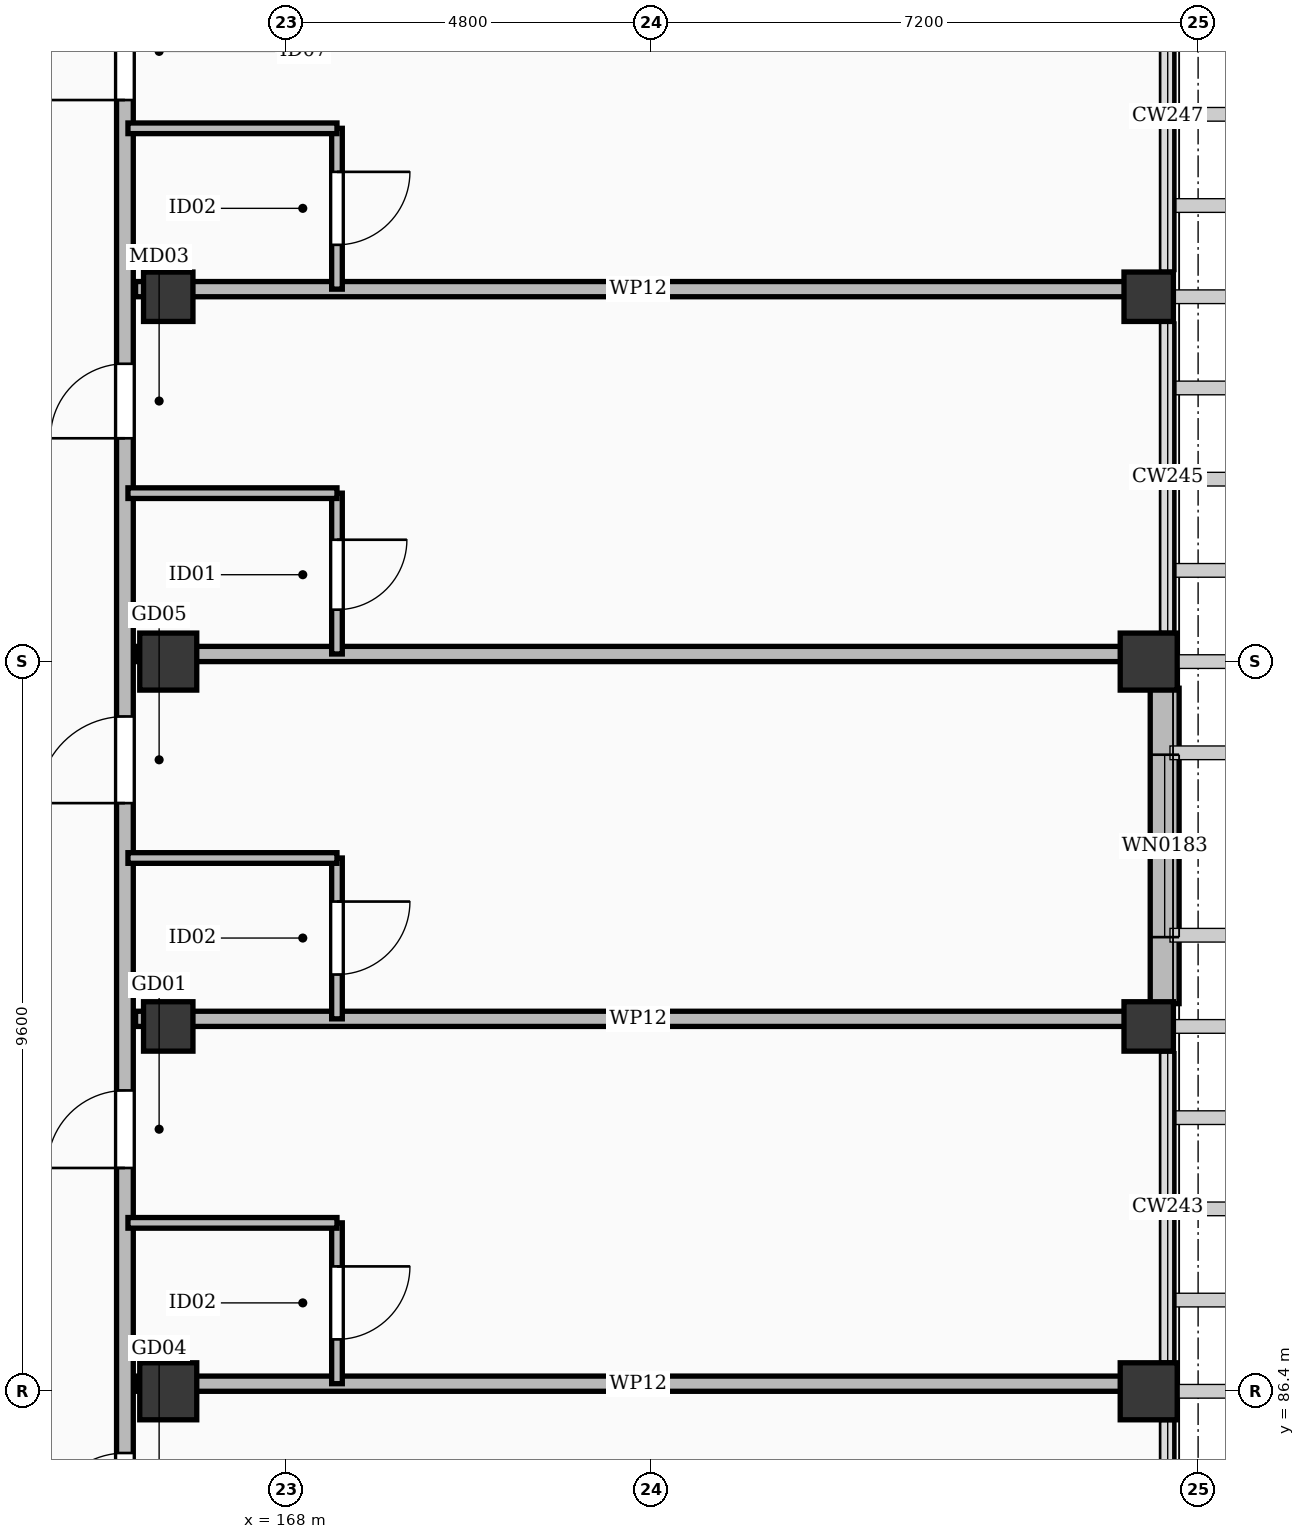
"""IFC4 building model, lengths in metres.
Left out: names, types, materials, properties, quantities, classifications, styles, units other than length and angle.
Written with IfcOpenShell. Run it as: python <this file> out.ifc"""

import sys

from ifc_helpers import new_model, si_unit, direction, frame, frame_2d, origin, origin_2d, place, context, subcontext, project, spatial, rectangle, extrude, element, fill, save


model = new_model("IFC4")
c1 = context("Model", 3, precision=1e-05, world=origin(), true_north=direction((0.0, 1.0)))
c2 = subcontext(c1, "Body", "Model", "MODEL_VIEW")
j1 = project(units=[si_unit("LENGTHUNIT", "METRE"), si_unit("PLANEANGLEUNIT", "RADIAN")], contexts=[c1])
p1 = place(None, origin())
s1 = spatial("IfcSite", under=j1, at=p1, CompositionType="ELEMENT")
p2 = place(p1, origin())
s2 = spatial("IfcBuilding", under=s1, at=p2, CompositionType="ELEMENT")
p3 = place(p2, frame((0.0, 0.0, 28.2)))
s3 = spatial("IfcBuildingStorey", under=s2, at=p3, CompositionType="ELEMENT", Elevation=28.2)
for number, where, z_axis, x_axis in (
    (1, (166.45, 86.4, 0.0), (0.0, 0.0, 1.0), (1.0, 0.0, 0.0)),
    (2, (166.45, 96.0, 0.0), (0.0, 0.0, 1.0), (1.0, 0.0, 0.0)),
    (3, (179.35, 86.4, 0.0), (0.0, 0.0, 1.0), (1.0, 0.0, 0.0)),
    (4, (179.35, 96.0, 0.0), (0.0, 0.0, 1.0), (1.0, 0.0, 0.0)),
):
    element("IfcColumn", number, at=place(p3, frame(where, z_axis=z_axis, x_axis=x_axis)), inside=s3, PredefinedType="COLUMN", context=c2, shape_type="SweptSolid", body=[
        extrude(rectangle(XDim=0.75, YDim=0.75, at=origin_2d()), origin(), (0.0, 0.0, 1.0), 3.6),
    ])
for number, where, z_axis, x_axis in (
    (5, (166.45, 91.2, 0.0), (0.0, 0.0, 1.0), (1.0, 0.0, 0.0)),
    (6, (166.45, 100.8, 0.0), (0.0, 0.0, 1.0), (1.0, 0.0, 0.0)),
    (7, (179.35, 91.2, 0.0), (0.0, 0.0, 1.0), (1.0, 0.0, 0.0)),
    (8, (179.35, 100.8, 0.0), (0.0, 0.0, 1.0), (1.0, 0.0, 0.0)),
):
    element("IfcColumn", number, at=place(p3, frame(where, z_axis=z_axis, x_axis=x_axis)), inside=s3, PredefinedType="COLUMN", context=c2, shape_type="SweptSolid", body=[
        extrude(rectangle(XDim=0.65, YDim=0.65, at=origin_2d()), origin(), (0.0, 0.0, 1.0), 3.6),
    ])
p4 = place(p3, frame((179.56, 95.65, 0.0), z_axis=(0.0, 0.0, 1.0), x_axis=(0.0, -1.0, 0.0)))
e9 = element("IfcWall", 9, at=p4, inside=s3, PredefinedType="SOLIDWALL", context=c2, shape_type="SweptSolid", body=[
    extrude(rectangle(XDim=4.15, YDim=0.38, at=frame_2d((2.075, 0.0))), origin(), (0.0, 0.0, 1.0), 2.582),
])
p5 = place(p4, frame((0.875, 0.0, 0.55)))
e10 = element("IfcOpeningElement", 10, at=p5, cuts=e9, PredefinedType="OPENING", context=c2, shape_type="SweptSolid", body=[
    extrude(rectangle(XDim=2.4, YDim=1.8, at=frame_2d((1.2, 0.9))), frame((0.0, 0.202, 0.0), z_axis=(0.0, -1.0, 0.0), x_axis=(1.0, 0.0, 0.0)), (0.0, 0.0, 1.0), 0.404),
])
p6 = place(p3, frame((165.88, 38.75, 0.0), z_axis=(0.0, 0.0, 1.0), x_axis=(0.0, 1.0, 0.0)))
e11 = element("IfcWall", 11, at=p6, inside=s3, PredefinedType="PARTITIONING", context=c2, shape_type="SweptSolid", body=[
    extrude(rectangle(XDim=86.9, YDim=0.22, at=frame_2d((43.45, 0.0))), origin(), (0.0, 0.0, 1.0), 2.582),
])
p7 = place(p6, frame((0.691, 0.0, 0.0)))
e12 = element("IfcOpeningElement", 12, at=p7, cuts=e11, PredefinedType="OPENING", context=c2, shape_type="SweptSolid", body=[
    extrude(rectangle(XDim=0.98, YDim=2.15, at=frame_2d((0.49, 1.075))), frame((0.0, 0.122, 0.0), z_axis=(0.0, -1.0, 0.0), x_axis=(1.0, 0.0, 0.0)), (0.0, 0.0, 1.0), 0.244),
])
p8 = place(p6, frame((7.038, 0.0, 0.0)))
e13 = element("IfcOpeningElement", 13, at=p8, cuts=e11, PredefinedType="OPENING", context=c2, shape_type="SweptSolid", body=[
    extrude(rectangle(XDim=1.28, YDim=2.16, at=frame_2d((0.64, 1.08))), frame((0.0, 0.122, 0.0), z_axis=(0.0, -1.0, 0.0), x_axis=(1.0, 0.0, 0.0)), (0.0, 0.0, 1.0), 0.244),
])
p9 = place(p6, frame((12.188, 0.0, 0.0)))
e14 = element("IfcOpeningElement", 14, at=p9, cuts=e11, PredefinedType="OPENING", context=c2, shape_type="SweptSolid", body=[
    extrude(rectangle(XDim=0.9, YDim=2.08, at=frame_2d((0.45, 1.04))), frame((0.0, 0.122, 0.0), z_axis=(0.0, -1.0, 0.0), x_axis=(1.0, 0.0, 0.0)), (0.0, 0.0, 1.0), 0.244),
])
p10 = place(p6, frame((16.988, 0.0, 0.0)))
e15 = element("IfcOpeningElement", 15, at=p10, cuts=e11, PredefinedType="OPENING", context=c2, shape_type="SweptSolid", body=[
    extrude(rectangle(XDim=1.05, YDim=2.22, at=frame_2d((0.525, 1.11))), frame((0.0, 0.122, 0.0), z_axis=(0.0, -1.0, 0.0), x_axis=(1.0, 0.0, 0.0)), (0.0, 0.0, 1.0), 0.244),
])
p11 = place(p6, frame((21.788, 0.0, 0.0)))
e16 = element("IfcOpeningElement", 16, at=p11, cuts=e11, PredefinedType="OPENING", context=c2, shape_type="SweptSolid", body=[
    extrude(rectangle(XDim=1.02, YDim=2.2, at=frame_2d((0.51, 1.1))), frame((0.0, 0.122, 0.0), z_axis=(0.0, -1.0, 0.0), x_axis=(1.0, 0.0, 0.0)), (0.0, 0.0, 1.0), 0.244),
])
p12 = place(p6, frame((26.588, 0.0, 0.0)))
e17 = element("IfcOpeningElement", 17, at=p12, cuts=e11, PredefinedType="OPENING", context=c2, shape_type="SweptSolid", body=[
    extrude(rectangle(XDim=1.14, YDim=2.26, at=frame_2d((0.57, 1.13))), frame((0.0, 0.122, 0.0), z_axis=(0.0, -1.0, 0.0), x_axis=(1.0, 0.0, 0.0)), (0.0, 0.0, 1.0), 0.244),
])
p13 = place(p6, frame((31.388, 0.0, 0.0)))
e18 = element("IfcOpeningElement", 18, at=p13, cuts=e11, PredefinedType="OPENING", context=c2, shape_type="SweptSolid", body=[
    extrude(rectangle(XDim=0.98, YDim=2.15, at=frame_2d((0.49, 1.075))), frame((0.0, 0.122, 0.0), z_axis=(0.0, -1.0, 0.0), x_axis=(1.0, 0.0, 0.0)), (0.0, 0.0, 1.0), 0.244),
])
p14 = place(p6, frame((35.838, 0.0, 0.0)))
e19 = element("IfcOpeningElement", 19, at=p14, cuts=e11, PredefinedType="OPENING", context=c2, shape_type="SweptSolid", body=[
    extrude(rectangle(XDim=1.28, YDim=2.16, at=frame_2d((0.64, 1.08))), frame((0.0, 0.122, 0.0), z_axis=(0.0, -1.0, 0.0), x_axis=(1.0, 0.0, 0.0)), (0.0, 0.0, 1.0), 0.244),
])
p15 = place(p6, frame((40.988, 0.0, 0.0)))
e20 = element("IfcOpeningElement", 20, at=p15, cuts=e11, PredefinedType="OPENING", context=c2, shape_type="SweptSolid", body=[
    extrude(rectangle(XDim=0.9, YDim=2.08, at=frame_2d((0.45, 1.04))), frame((0.0, 0.122, 0.0), z_axis=(0.0, -1.0, 0.0), x_axis=(1.0, 0.0, 0.0)), (0.0, 0.0, 1.0), 0.244),
])
p16 = place(p6, frame((45.788, 0.0, 0.0)))
e21 = element("IfcOpeningElement", 21, at=p16, cuts=e11, PredefinedType="OPENING", context=c2, shape_type="SweptSolid", body=[
    extrude(rectangle(XDim=1.05, YDim=2.22, at=frame_2d((0.525, 1.11))), frame((0.0, 0.122, 0.0), z_axis=(0.0, -1.0, 0.0), x_axis=(1.0, 0.0, 0.0)), (0.0, 0.0, 1.0), 0.244),
])
p17 = place(p6, frame((50.588, 0.0, 0.0)))
e22 = element("IfcOpeningElement", 22, at=p17, cuts=e11, PredefinedType="OPENING", context=c2, shape_type="SweptSolid", body=[
    extrude(rectangle(XDim=1.02, YDim=2.2, at=frame_2d((0.51, 1.1))), frame((0.0, 0.122, 0.0), z_axis=(0.0, -1.0, 0.0), x_axis=(1.0, 0.0, 0.0)), (0.0, 0.0, 1.0), 0.244),
])
p18 = place(p6, frame((55.388, 0.0, 0.0)))
e23 = element("IfcOpeningElement", 23, at=p18, cuts=e11, PredefinedType="OPENING", context=c2, shape_type="SweptSolid", body=[
    extrude(rectangle(XDim=1.14, YDim=2.26, at=frame_2d((0.57, 1.13))), frame((0.0, 0.122, 0.0), z_axis=(0.0, -1.0, 0.0), x_axis=(1.0, 0.0, 0.0)), (0.0, 0.0, 1.0), 0.244),
])
p19 = place(p6, frame((60.188, 0.0, 0.0)))
e24 = element("IfcOpeningElement", 24, at=p19, cuts=e11, PredefinedType="OPENING", context=c2, shape_type="SweptSolid", body=[
    extrude(rectangle(XDim=0.98, YDim=2.15, at=frame_2d((0.49, 1.075))), frame((0.0, 0.122, 0.0), z_axis=(0.0, -1.0, 0.0), x_axis=(1.0, 0.0, 0.0)), (0.0, 0.0, 1.0), 0.244),
])
p20 = place(p6, frame((64.638, 0.0, 0.0)))
e25 = element("IfcOpeningElement", 25, at=p20, cuts=e11, PredefinedType="OPENING", context=c2, shape_type="SweptSolid", body=[
    extrude(rectangle(XDim=1.28, YDim=2.16, at=frame_2d((0.64, 1.08))), frame((0.0, 0.122, 0.0), z_axis=(0.0, -1.0, 0.0), x_axis=(1.0, 0.0, 0.0)), (0.0, 0.0, 1.0), 0.244),
])
p21 = place(p6, frame((69.788, 0.0, 0.0)))
e26 = element("IfcOpeningElement", 26, at=p21, cuts=e11, PredefinedType="OPENING", context=c2, shape_type="SweptSolid", body=[
    extrude(rectangle(XDim=0.9, YDim=2.08, at=frame_2d((0.45, 1.04))), frame((0.0, 0.122, 0.0), z_axis=(0.0, -1.0, 0.0), x_axis=(1.0, 0.0, 0.0)), (0.0, 0.0, 1.0), 0.244),
])
p22 = place(p6, frame((74.588, 0.0, 0.0)))
e27 = element("IfcOpeningElement", 27, at=p22, cuts=e11, PredefinedType="OPENING", context=c2, shape_type="SweptSolid", body=[
    extrude(rectangle(XDim=1.05, YDim=2.22, at=frame_2d((0.525, 1.11))), frame((0.0, 0.122, 0.0), z_axis=(0.0, -1.0, 0.0), x_axis=(1.0, 0.0, 0.0)), (0.0, 0.0, 1.0), 0.244),
])
p23 = place(p6, frame((79.388, 0.0, 0.0)))
e28 = element("IfcOpeningElement", 28, at=p23, cuts=e11, PredefinedType="OPENING", context=c2, shape_type="SweptSolid", body=[
    extrude(rectangle(XDim=1.02, YDim=2.2, at=frame_2d((0.51, 1.1))), frame((0.0, 0.122, 0.0), z_axis=(0.0, -1.0, 0.0), x_axis=(1.0, 0.0, 0.0)), (0.0, 0.0, 1.0), 0.244),
])
p24 = place(p6, frame((84.188, 0.0, 0.0)))
e29 = element("IfcOpeningElement", 29, at=p24, cuts=e11, PredefinedType="OPENING", context=c2, shape_type="SweptSolid", body=[
    extrude(rectangle(XDim=1.14, YDim=2.26, at=frame_2d((0.57, 1.13))), frame((0.0, 0.122, 0.0), z_axis=(0.0, -1.0, 0.0), x_axis=(1.0, 0.0, 0.0)), (0.0, 0.0, 1.0), 0.244),
])
p25 = place(p3, frame((166.02, 86.5, 0.0), z_axis=(0.0, 0.0, 1.0), x_axis=(1.0, 0.0, 0.0)))
e30 = element("IfcWall", 30, at=p25, inside=s3, PredefinedType="PARTITIONING", context=c2, shape_type="SweptSolid", body=[
    extrude(rectangle(XDim=13.23, YDim=0.2, at=frame_2d((6.615, 0.0))), origin(), (0.0, 0.0, 1.0), 2.582),
])
p26 = place(p3, frame((168.67, 86.5, 0.0), z_axis=(0.0, 0.0, 1.0), x_axis=(0.0, 1.0, 0.0)))
e31 = element("IfcWall", 31, at=p26, inside=s3, PredefinedType="PARTITIONING", context=c2, shape_type="SweptSolid", body=[
    extrude(rectangle(XDim=2.116, YDim=0.14, at=frame_2d((1.058, 0.0))), origin(), (0.0, 0.0, 1.0), 2.682),
])
p27 = place(p26, frame((0.583, 0.0, 0.0)))
e32 = element("IfcOpeningElement", 32, at=p27, cuts=e31, PredefinedType="OPENING", context=c2, shape_type="SweptSolid", body=[
    extrude(rectangle(XDim=0.96, YDim=2.12, at=frame_2d((0.48, 1.06))), frame((0.0, 0.082, 0.0), z_axis=(0.0, -1.0, 0.0), x_axis=(1.0, 0.0, 0.0)), (0.0, 0.0, 1.0), 0.164),
])
p28 = place(p3, frame((165.92, 88.616, 0.0), z_axis=(0.0, 0.0, 1.0), x_axis=(1.0, 0.0, 0.0)))
e33 = element("IfcWall", 33, at=p28, inside=s3, PredefinedType="PARTITIONING", context=c2, shape_type="SweptSolid", body=[
    extrude(rectangle(XDim=2.75, YDim=0.14, at=frame_2d((1.375, 0.0))), origin(), (0.0, 0.0, 1.0), 2.682),
])
p29 = place(p3, frame((166.02, 91.3, 0.0), z_axis=(0.0, 0.0, 1.0), x_axis=(1.0, 0.0, 0.0)))
e34 = element("IfcWall", 34, at=p29, inside=s3, PredefinedType="PARTITIONING", context=c2, shape_type="SweptSolid", body=[
    extrude(rectangle(XDim=13.23, YDim=0.2, at=frame_2d((6.615, 0.0))), origin(), (0.0, 0.0, 1.0), 2.582),
])
p30 = place(p3, frame((168.67, 91.3, 0.0), z_axis=(0.0, 0.0, 1.0), x_axis=(0.0, 1.0, 0.0)))
e35 = element("IfcWall", 35, at=p30, inside=s3, PredefinedType="PARTITIONING", context=c2, shape_type="SweptSolid", body=[
    extrude(rectangle(XDim=2.116, YDim=0.14, at=frame_2d((1.058, 0.0))), origin(), (0.0, 0.0, 1.0), 2.682),
])
p31 = place(p30, frame((0.583, 0.0, 0.0)))
e36 = element("IfcOpeningElement", 36, at=p31, cuts=e35, PredefinedType="OPENING", context=c2, shape_type="SweptSolid", body=[
    extrude(rectangle(XDim=0.96, YDim=2.12, at=frame_2d((0.48, 1.06))), frame((0.0, 0.082, 0.0), z_axis=(0.0, -1.0, 0.0), x_axis=(1.0, 0.0, 0.0)), (0.0, 0.0, 1.0), 0.164),
])
p32 = place(p3, frame((165.92, 93.416, 0.0), z_axis=(0.0, 0.0, 1.0), x_axis=(1.0, 0.0, 0.0)))
e37 = element("IfcWall", 37, at=p32, inside=s3, PredefinedType="PARTITIONING", context=c2, shape_type="SweptSolid", body=[
    extrude(rectangle(XDim=2.75, YDim=0.14, at=frame_2d((1.375, 0.0))), origin(), (0.0, 0.0, 1.0), 2.682),
])
p33 = place(p3, frame((166.02, 96.1, 0.0), z_axis=(0.0, 0.0, 1.0), x_axis=(1.0, 0.0, 0.0)))
e38 = element("IfcWall", 38, at=p33, inside=s3, PredefinedType="PARTITIONING", context=c2, shape_type="SweptSolid", body=[
    extrude(rectangle(XDim=13.23, YDim=0.2, at=frame_2d((6.615, 0.0))), origin(), (0.0, 0.0, 1.0), 2.582),
])
p34 = place(p3, frame((168.67, 96.1, 0.0), z_axis=(0.0, 0.0, 1.0), x_axis=(0.0, 1.0, 0.0)))
e39 = element("IfcWall", 39, at=p34, inside=s3, PredefinedType="PARTITIONING", context=c2, shape_type="SweptSolid", body=[
    extrude(rectangle(XDim=2.116, YDim=0.14, at=frame_2d((1.058, 0.0))), origin(), (0.0, 0.0, 1.0), 2.682),
])
p35 = place(p34, frame((0.583, 0.0, 0.0)))
e40 = element("IfcOpeningElement", 40, at=p35, cuts=e39, PredefinedType="OPENING", context=c2, shape_type="SweptSolid", body=[
    extrude(rectangle(XDim=0.92, YDim=2.1, at=frame_2d((0.46, 1.05))), frame((0.0, 0.082, 0.0), z_axis=(0.0, -1.0, 0.0), x_axis=(1.0, 0.0, 0.0)), (0.0, 0.0, 1.0), 0.164),
])
p36 = place(p3, frame((165.92, 98.216, 0.0), z_axis=(0.0, 0.0, 1.0), x_axis=(1.0, 0.0, 0.0)))
e41 = element("IfcWall", 41, at=p36, inside=s3, PredefinedType="PARTITIONING", context=c2, shape_type="SweptSolid", body=[
    extrude(rectangle(XDim=2.75, YDim=0.14, at=frame_2d((1.375, 0.0))), origin(), (0.0, 0.0, 1.0), 2.682),
])
p37 = place(p3, frame((166.02, 100.9, 0.0), z_axis=(0.0, 0.0, 1.0), x_axis=(1.0, 0.0, 0.0)))
e42 = element("IfcWall", 42, at=p37, inside=s3, PredefinedType="PARTITIONING", context=c2, shape_type="SweptSolid", body=[
    extrude(rectangle(XDim=13.23, YDim=0.2, at=frame_2d((6.615, 0.0))), origin(), (0.0, 0.0, 1.0), 2.582),
])
p38 = place(p3, frame((168.67, 100.9, 0.0), z_axis=(0.0, 0.0, 1.0), x_axis=(0.0, 1.0, 0.0)))
e43 = element("IfcWall", 43, at=p38, inside=s3, PredefinedType="PARTITIONING", context=c2, shape_type="SweptSolid", body=[
    extrude(rectangle(XDim=2.116, YDim=0.14, at=frame_2d((1.058, 0.0))), origin(), (0.0, 0.0, 1.0), 2.682),
])
p39 = place(p38, frame((0.583, 0.0, 0.0)))
e44 = element("IfcOpeningElement", 44, at=p39, cuts=e43, PredefinedType="OPENING", context=c2, shape_type="SweptSolid", body=[
    extrude(rectangle(XDim=0.96, YDim=2.12, at=frame_2d((0.48, 1.06))), frame((0.0, 0.082, 0.0), z_axis=(0.0, -1.0, 0.0), x_axis=(1.0, 0.0, 0.0)), (0.0, 0.0, 1.0), 0.164),
])
p40 = place(p3, frame((165.92, 103.016, 0.0), z_axis=(0.0, 0.0, 1.0), x_axis=(1.0, 0.0, 0.0)))
e45 = element("IfcWall", 45, at=p40, inside=s3, PredefinedType="PARTITIONING", context=c2, shape_type="SweptSolid", body=[
    extrude(rectangle(XDim=2.75, YDim=0.14, at=frame_2d((1.375, 0.0))), origin(), (0.0, 0.0, 1.0), 2.682),
])
p41 = place(p5, origin())
e46 = element("IfcWindow", 46, at=p41, inside=s3, PartitioningType="SINGLE_PANEL", PredefinedType="WINDOW", context=c2, shape_type="SweptSolid", body=[
    extrude(rectangle(XDim=2.4, YDim=1.8, at=frame_2d((1.2, 0.9))), frame((0.0, 0.03, 0.0), z_axis=(0.0, -1.0, 0.0), x_axis=(1.0, 0.0, 0.0)), (0.0, 0.0, 1.0), 0.06),
])
fill(e10, e46)
p42 = place(p16, origin())
e47 = element("IfcDoor", 47, at=p42, inside=s3, OperationType="SINGLE_SWING_LEFT", PredefinedType="DOOR", context=c2, shape_type="SweptSolid", body=[
    extrude(rectangle(XDim=1.05, YDim=2.22, at=frame_2d((0.525, 1.11))), frame((0.0, 0.025, 0.0), z_axis=(0.0, -1.0, 0.0), x_axis=(1.0, 0.0, 0.0)), (0.0, 0.0, 1.0), 0.05),
])
fill(e21, e47)
p43 = place(p17, origin())
e48 = element("IfcDoor", 48, at=p43, inside=s3, OperationType="SINGLE_SWING_LEFT", PredefinedType="DOOR", context=c2, shape_type="SweptSolid", body=[
    extrude(rectangle(XDim=1.02, YDim=2.2, at=frame_2d((0.51, 1.1))), frame((0.0, 0.025, 0.0), z_axis=(0.0, -1.0, 0.0), x_axis=(1.0, 0.0, 0.0)), (0.0, 0.0, 1.0), 0.05),
])
fill(e22, e48)
p44 = place(p27, frame((0.96, 0.0, 0.0), z_axis=(0.0, 0.0, 1.0), x_axis=(-1.0, 0.0, 0.0)))
e49 = element("IfcDoor", 49, at=p44, inside=s3, OperationType="SINGLE_SWING_RIGHT", PredefinedType="DOOR", context=c2, shape_type="SweptSolid", body=[
    extrude(rectangle(XDim=0.96, YDim=2.12, at=frame_2d((0.48, 1.06))), frame((0.0, 0.025, 0.0), z_axis=(0.0, -1.0, 0.0), x_axis=(1.0, 0.0, 0.0)), (0.0, 0.0, 1.0), 0.05),
])
fill(e32, e49)
p45 = place(p18, origin())
e50 = element("IfcDoor", 50, at=p45, inside=s3, OperationType="SINGLE_SWING_LEFT", PredefinedType="DOOR", context=c2, shape_type="SweptSolid", body=[
    extrude(rectangle(XDim=1.14, YDim=2.26, at=frame_2d((0.57, 1.13))), frame((0.0, 0.025, 0.0), z_axis=(0.0, -1.0, 0.0), x_axis=(1.0, 0.0, 0.0)), (0.0, 0.0, 1.0), 0.05),
])
fill(e23, e50)
p46 = place(p31, frame((0.96, 0.0, 0.0), z_axis=(0.0, 0.0, 1.0), x_axis=(-1.0, 0.0, 0.0)))
e51 = element("IfcDoor", 51, at=p46, inside=s3, OperationType="SINGLE_SWING_RIGHT", PredefinedType="DOOR", context=c2, shape_type="SweptSolid", body=[
    extrude(rectangle(XDim=0.96, YDim=2.12, at=frame_2d((0.48, 1.06))), frame((0.0, 0.025, 0.0), z_axis=(0.0, -1.0, 0.0), x_axis=(1.0, 0.0, 0.0)), (0.0, 0.0, 1.0), 0.05),
])
fill(e36, e51)
p47 = place(p19, origin())
e52 = element("IfcDoor", 52, at=p47, inside=s3, OperationType="SINGLE_SWING_LEFT", PredefinedType="DOOR", context=c2, shape_type="SweptSolid", body=[
    extrude(rectangle(XDim=0.98, YDim=2.15, at=frame_2d((0.49, 1.075))), frame((0.0, 0.025, 0.0), z_axis=(0.0, -1.0, 0.0), x_axis=(1.0, 0.0, 0.0)), (0.0, 0.0, 1.0), 0.05),
])
fill(e24, e52)
p48 = place(p35, frame((0.92, 0.0, 0.0), z_axis=(0.0, 0.0, 1.0), x_axis=(-1.0, 0.0, 0.0)))
e53 = element("IfcDoor", 53, at=p48, inside=s3, OperationType="SINGLE_SWING_RIGHT", PredefinedType="DOOR", context=c2, shape_type="SweptSolid", body=[
    extrude(rectangle(XDim=0.92, YDim=2.1, at=frame_2d((0.46, 1.05))), frame((0.0, 0.025, 0.0), z_axis=(0.0, -1.0, 0.0), x_axis=(1.0, 0.0, 0.0)), (0.0, 0.0, 1.0), 0.05),
])
fill(e40, e53)
p49 = place(p20, origin())
e54 = element("IfcDoor", 54, at=p49, inside=s3, OperationType="SINGLE_SWING_LEFT", PredefinedType="DOOR", context=c2, shape_type="SweptSolid", body=[
    extrude(rectangle(XDim=1.28, YDim=2.16, at=frame_2d((0.64, 1.08))), frame((0.0, 0.025, 0.0), z_axis=(0.0, -1.0, 0.0), x_axis=(1.0, 0.0, 0.0)), (0.0, 0.0, 1.0), 0.05),
])
fill(e25, e54)
p50 = place(p39, frame((0.96, 0.0, 0.0), z_axis=(0.0, 0.0, 1.0), x_axis=(-1.0, 0.0, 0.0)))
e55 = element("IfcDoor", 55, at=p50, inside=s3, OperationType="SINGLE_SWING_RIGHT", PredefinedType="DOOR", context=c2, shape_type="SweptSolid", body=[
    extrude(rectangle(XDim=0.96, YDim=2.12, at=frame_2d((0.48, 1.06))), frame((0.0, 0.025, 0.0), z_axis=(0.0, -1.0, 0.0), x_axis=(1.0, 0.0, 0.0)), (0.0, 0.0, 1.0), 0.05),
])
fill(e44, e55)
save(model, sys.argv[1])
